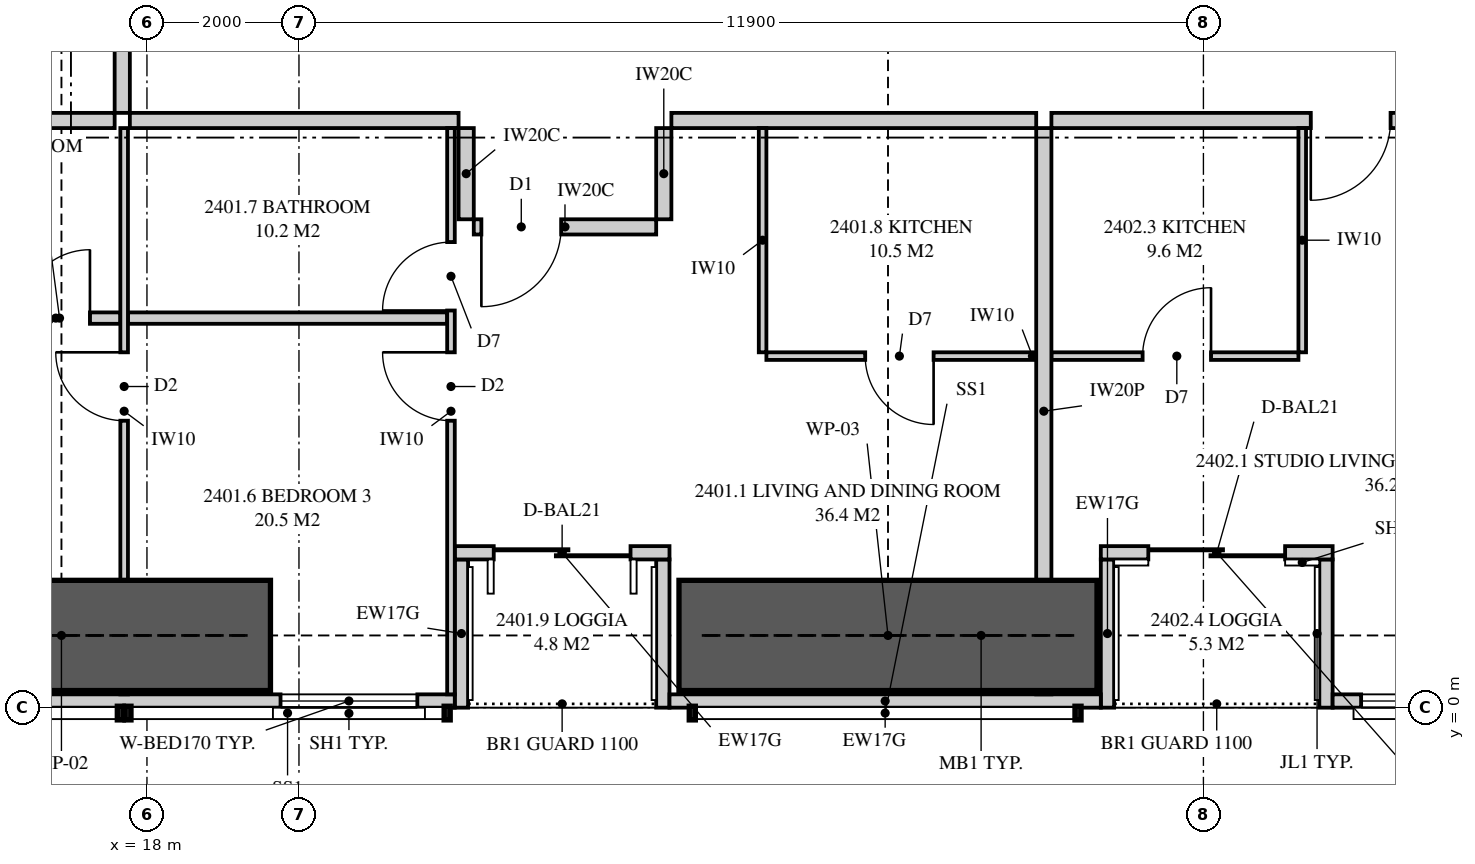
"""IFC4 building model, lengths in metres.
Left out: names, types, materials, properties, quantities, classifications, styles, units other than length and angle.
Written with IfcOpenShell. Run it as: python <this file> out.ifc"""

import sys

from ifc_helpers import new_model, si_unit, direction, frame, frame_2d, origin, place, context, subcontext, project, spatial, polyline, rectangle, outline, extrude, element, fill, save


model = new_model("IFC4")
c1 = context("Model", 3, precision=1e-05, world=origin(), true_north=direction((0.0, 1.0)))
c2 = subcontext(c1, "Body", "Model", "MODEL_VIEW")
j1 = project(units=[si_unit("LENGTHUNIT", "METRE"), si_unit("PLANEANGLEUNIT", "RADIAN")], contexts=[c1])
p1 = place(None, origin())
s1 = spatial("IfcSite", under=j1, at=p1, CompositionType="ELEMENT")
p2 = place(p1, origin())
s2 = spatial("IfcBuilding", under=s1, at=p2, CompositionType="ELEMENT")
p3 = place(p2, frame((0.0, 0.0, 91.45)))
s3 = spatial("IfcBuildingStorey", under=s2, at=p3, CompositionType="ELEMENT", Elevation=91.45)
p4 = place(p3, frame((9.051, 0.087, 0.0), z_axis=(0.0, 0.0, 1.0), x_axis=(1.0, 0.0, 0.0)))
e1 = element("IfcWall", 1, at=p4, inside=s3, PredefinedType="SOLIDWALL", context=c2, shape_type="SweptSolid", body=[
    extrude(outline(polyline([(0.0, 0.0), (12.999, 0.0), (12.999, 2.15), (7.824, 2.15), (7.824, 3.11), (7.666, 3.11), (7.666, 2.15), (7.62, 2.15), (7.62, 3.11), (0.0, 3.11), (0.0, 0.0)])), frame((0.0, 0.087, 0.0), z_axis=(0.0, -1.0, 0.0), x_axis=(1.0, 0.0, 0.0)), (0.0, 0.0, 1.0), 0.175),
])
p5 = place(p4, frame((3.134, 0.0, 0.4)))
e2 = element("IfcOpeningElement", 2, at=p5, cuts=e1, PredefinedType="OPENING", context=c2, shape_type="SweptSolid", body=[
    extrude(rectangle(XDim=1.8, YDim=1.7, at=frame_2d((0.9, 0.85))), frame((0.0, 0.097, 0.0), z_axis=(0.0, -1.0, 0.0), x_axis=(1.0, 0.0, 0.0)), (0.0, 0.0, 1.0), 0.195),
])
p6 = place(p4, frame((10.706, 0.0, 0.4)))
e3 = element("IfcOpeningElement", 3, at=p6, cuts=e1, PredefinedType="OPENING", context=c2, shape_type="SweptSolid", body=[
    extrude(rectangle(XDim=1.8, YDim=1.7, at=frame_2d((0.9, 0.85))), frame((0.0, 0.097, 0.0), z_axis=(0.0, -1.0, 0.0), x_axis=(1.0, 0.0, 0.0)), (0.0, 0.0, 1.0), 0.195),
])
p7 = place(p3, frame((24.875, 0.087, 0.0), z_axis=(0.0, 0.0, 1.0), x_axis=(1.0, 0.0, 0.0)))
e4 = element("IfcWall", 4, at=p7, inside=s3, PredefinedType="SOLIDWALL", context=c2, shape_type="SweptSolid", body=[
    extrude(rectangle(XDim=5.675, YDim=0.175, at=frame_2d((2.837, 0.0))), origin(), (0.0, 0.0, 1.0), 2.15),
])
p8 = place(p3, frame((33.6, 0.087, 0.0), z_axis=(0.0, 0.0, 1.0), x_axis=(1.0, 0.0, 0.0)))
e5 = element("IfcWall", 5, at=p8, inside=s3, PredefinedType="SOLIDWALL", context=c2, shape_type="SweptSolid", body=[
    extrude(outline(polyline([(0.0, 0.0), (7.825, 0.0), (7.825, 3.11), (5.228, 3.11), (5.228, 2.15), (5.183, 2.15), (5.183, 3.11), (5.025, 3.11), (5.025, 2.15), (0.0, 2.15), (0.0, 0.0)])), frame((0.0, 0.087, 0.0), z_axis=(0.0, -1.0, 0.0), x_axis=(1.0, 0.0, 0.0)), (0.0, 0.0, 1.0), 0.175),
])
p9 = place(p8, frame((0.375, 0.0, 0.4)))
e6 = element("IfcOpeningElement", 6, at=p9, cuts=e5, PredefinedType="OPENING", context=c2, shape_type="SweptSolid", body=[
    extrude(rectangle(XDim=1.8, YDim=1.7, at=frame_2d((0.9, 0.85))), frame((0.0, 0.097, 0.0), z_axis=(0.0, -1.0, 0.0), x_axis=(1.0, 0.0, 0.0)), (0.0, 0.0, 1.0), 0.195),
])
p10 = place(p3, frame((22.05, 2.038, 0.0), z_axis=(0.0, 0.0, 1.0), x_axis=(1.0, 0.0, 0.0)))
e7 = element("IfcWall", 7, at=p10, inside=s3, PredefinedType="SOLIDWALL", context=c2, shape_type="SweptSolid", body=[
    extrude(rectangle(XDim=2.825, YDim=0.175, at=frame_2d((1.413, 0.0))), origin(), (0.0, 0.0, 1.0), 3.11),
])
p11 = place(p10, frame((0.512, 0.0, 0.0)))
e8 = element("IfcOpeningElement", 8, at=p11, cuts=e7, PredefinedType="OPENING", context=c2, shape_type="SweptSolid", body=[
    extrude(rectangle(XDim=1.8, YDim=2.1, at=frame_2d((0.9, 1.05))), frame((0.0, 0.097, 0.0), z_axis=(0.0, -1.0, 0.0), x_axis=(1.0, 0.0, 0.0)), (0.0, 0.0, 1.0), 0.195),
])
for number, where, z_axis, x_axis in (
    (9, (22.137, 0.0, 0.0), (0.0, 0.0, 1.0), (0.0, 1.0, 0.0)),
    (10, (24.788, 0.0, 0.0), (0.0, 0.0, 1.0), (0.0, 1.0, 0.0)),
):
    element("IfcWall", number, at=place(p3, frame(where, z_axis=z_axis, x_axis=x_axis)), inside=s3, PredefinedType="SOLIDWALL", context=c2, shape_type="SweptSolid", body=[
        extrude(outline(polyline([(0.0, 0.0), (1.95, 0.0), (1.95, 3.11), (1.75, 3.11), (1.75, 2.15), (0.15, 2.15), (0.15, 3.11), (0.0, 3.11), (0.0, 0.0)])), frame((0.0, 0.087, 0.0), z_axis=(0.0, -1.0, 0.0), x_axis=(1.0, 0.0, 0.0)), (0.0, 0.0, 1.0), 0.175),
    ])
p12 = place(p3, frame((30.55, 2.038, 0.0), z_axis=(0.0, 0.0, 1.0), x_axis=(1.0, 0.0, 0.0)))
e11 = element("IfcWall", 11, at=p12, inside=s3, PredefinedType="SOLIDWALL", context=c2, shape_type="SweptSolid", body=[
    extrude(rectangle(XDim=3.05, YDim=0.175, at=frame_2d((1.525, 0.0))), origin(), (0.0, 0.0, 1.0), 3.11),
])
p13 = place(p12, frame((0.625, 0.0, 0.0)))
e12 = element("IfcOpeningElement", 12, at=p13, cuts=e11, PredefinedType="OPENING", context=c2, shape_type="SweptSolid", body=[
    extrude(rectangle(XDim=1.8, YDim=2.1, at=frame_2d((0.9, 1.05))), frame((0.0, 0.097, 0.0), z_axis=(0.0, -1.0, 0.0), x_axis=(1.0, 0.0, 0.0)), (0.0, 0.0, 1.0), 0.195),
])
for number, where, z_axis, x_axis in (
    (13, (30.637, 0.0, 0.0), (0.0, 0.0, 1.0), (0.0, 1.0, 0.0)),
    (14, (33.512, 0.0, 0.0), (0.0, 0.0, 1.0), (0.0, 1.0, 0.0)),
):
    element("IfcWall", number, at=place(p3, frame(where, z_axis=z_axis, x_axis=x_axis)), inside=s3, PredefinedType="SOLIDWALL", context=c2, shape_type="SweptSolid", body=[
        extrude(outline(polyline([(0.0, 0.0), (1.95, 0.0), (1.95, 3.11), (1.75, 3.11), (1.75, 2.15), (0.15, 2.15), (0.15, 3.11), (0.0, 3.11), (0.0, 0.0)])), frame((0.0, 0.087, 0.0), z_axis=(0.0, -1.0, 0.0), x_axis=(1.0, 0.0, 0.0)), (0.0, 0.0, 1.0), 0.175),
    ])
p14 = place(p3, frame((29.8, 0.175, 0.0), z_axis=(0.0, 0.0, 1.0), x_axis=(0.0, 1.0, 0.0)))
e15 = element("IfcWall", 15, at=p14, inside=s3, PredefinedType="PARTITIONING", context=c2, shape_type="SweptSolid", body=[
    extrude(outline(polyline([(0.529, 2.15), (0.0, 2.15), (0.0, 0.0), (0.529, 0.0), (0.529, 0.103), (1.021, 0.103), (1.021, 0.0), (7.45, 0.0), (7.45, 3.11), (1.685, 3.11), (1.685, 2.15), (1.021, 2.15), (1.021, 2.047), (0.529, 2.047), (0.529, 2.15)])), frame((0.0, 0.1, 0.0), z_axis=(0.0, -1.0, 0.0), x_axis=(1.0, 0.0, 0.0)), (0.0, 0.0, 1.0), 0.2),
])
p15 = place(p3, frame((17.775, 7.725, 0.0), z_axis=(0.0, 0.0, 1.0), x_axis=(1.0, 0.0, 0.0)))
e16 = element("IfcWall", 16, at=p15, inside=s3, PredefinedType="PARTITIONING", context=c2, shape_type="SweptSolid", body=[
    extrude(rectangle(XDim=4.325, YDim=0.2, at=frame_2d((2.163, 0.0))), origin(), (0.0, 0.0, 1.0), 3.11),
])
p16 = place(p3, frame((17.7, 0.175, 0.0), z_axis=(0.0, 0.0, 1.0), x_axis=(0.0, 1.0, 0.0)))
e17 = element("IfcWall", 17, at=p16, inside=s3, PredefinedType="PARTITIONING", context=c2, shape_type="SweptSolid", body=[
    extrude(outline(polyline([(1.635, 2.15), (0.0, 2.15), (0.0, 0.0), (7.45, 0.0), (7.45, 3.11), (1.635, 3.11), (1.635, 2.15)]), holes=[polyline([(1.021, 0.116), (0.529, 0.116), (0.529, 0.906), (1.021, 0.906), (1.021, 0.116)]), polyline([(1.021, 1.244), (0.529, 1.244), (0.529, 2.034), (1.021, 2.034), (1.021, 1.244)])]), frame((0.0, 0.05, 0.0), z_axis=(0.0, -1.0, 0.0), x_axis=(1.0, 0.0, 0.0)), (0.0, 0.0, 1.0), 0.1),
])
p17 = place(p16, frame((3.6, 0.0, 0.0)))
e18 = element("IfcOpeningElement", 18, at=p17, cuts=e17, PredefinedType="OPENING", context=c2, shape_type="SweptSolid", body=[
    extrude(rectangle(XDim=0.9, YDim=2.1, at=frame_2d((0.45, 1.05))), frame((0.0, 0.06, 0.0), z_axis=(0.0, -1.0, 0.0), x_axis=(1.0, 0.0, 0.0)), (0.0, 0.0, 1.0), 0.12),
])
p18 = place(p3, frame((22.0, 0.175, 0.0), z_axis=(0.0, 0.0, 1.0), x_axis=(0.0, 1.0, 0.0)))
e19 = element("IfcWall", 19, at=p18, inside=s3, PredefinedType="PARTITIONING", context=c2, shape_type="SweptSolid", body=[
    extrude(outline(polyline([(0.0, 0.0), (7.45, 0.0), (7.45, 3.11), (1.635, 3.11), (1.635, 2.15), (0.0, 2.15), (0.0, 3.11), (0.0, 0.0)])), frame((0.0, 0.05, 0.0), z_axis=(0.0, -1.0, 0.0), x_axis=(1.0, 0.0, 0.0)), (0.0, 0.0, 1.0), 0.1),
])
p19 = place(p18, frame((3.6, 0.0, 0.0)))
e20 = element("IfcOpeningElement", 20, at=p19, cuts=e19, PredefinedType="OPENING", context=c2, shape_type="SweptSolid", body=[
    extrude(rectangle(XDim=0.9, YDim=2.1, at=frame_2d((0.45, 1.05))), frame((0.0, 0.06, 0.0), z_axis=(0.0, -1.0, 0.0), x_axis=(1.0, 0.0, 0.0)), (0.0, 0.0, 1.0), 0.12),
])
p20 = place(p18, frame((5.05, 0.0, 0.0)))
e21 = element("IfcOpeningElement", 21, at=p20, cuts=e19, PredefinedType="OPENING", context=c2, shape_type="SweptSolid", body=[
    extrude(rectangle(XDim=0.9, YDim=2.1, at=frame_2d((0.45, 1.05))), frame((0.0, 0.06, 0.0), z_axis=(0.0, -1.0, 0.0), x_axis=(1.0, 0.0, 0.0)), (0.0, 0.0, 1.0), 0.12),
])
p21 = place(p3, frame((11.75, 5.125, 0.0), z_axis=(0.0, 0.0, 1.0), x_axis=(1.0, 0.0, 0.0)))
e22 = element("IfcWall", 22, at=p21, inside=s3, PredefinedType="PLUMBINGWALL", context=c2, shape_type="SweptSolid", body=[
    extrude(outline(polyline([(0.0, 0.0), (5.9, 0.0), (5.9, 3.11), (5.438, 3.11), (5.438, 2.541), (4.812, 2.541), (4.812, 3.11), (0.0, 3.11), (0.0, 0.0)])), frame((0.0, 0.075, 0.0), z_axis=(0.0, -1.0, 0.0), x_axis=(1.0, 0.0, 0.0)), (0.0, 0.0, 1.0), 0.15),
])
p22 = place(p21, frame((4.6, 0.0, 0.0)))
e23 = element("IfcOpeningElement", 23, at=p22, cuts=e22, PredefinedType="OPENING", context=c2, shape_type="SweptSolid", body=[
    extrude(rectangle(XDim=0.9, YDim=2.1, at=frame_2d((0.45, 1.05))), frame((0.0, 0.085, 0.0), z_axis=(0.0, -1.0, 0.0), x_axis=(1.0, 0.0, 0.0)), (0.0, 0.0, 1.0), 0.17),
])
p23 = place(p3, frame((17.75, 5.125, 0.0), z_axis=(0.0, 0.0, 1.0), x_axis=(1.0, 0.0, 0.0)))
e24 = element("IfcWall", 24, at=p23, inside=s3, PredefinedType="PLUMBINGWALL", context=c2, shape_type="SweptSolid", body=[
    extrude(rectangle(XDim=4.2, YDim=0.15, at=frame_2d((2.1, 0.0))), origin(), (0.0, 0.0, 1.0), 3.11),
])
p24 = place(p3, frame((26.15, 4.625, 0.0), z_axis=(0.0, 0.0, 1.0), x_axis=(1.0, 0.0, 0.0)))
e25 = element("IfcWall", 25, at=p24, inside=s3, PredefinedType="PARTITIONING", context=c2, shape_type="SweptSolid", body=[
    extrude(outline(polyline([(0.0, 0.0), (3.55, 0.0), (3.55, 3.11), (1.887, 3.11), (1.887, 2.541), (1.312, 2.541), (1.312, 3.11), (0.0, 3.11), (0.0, 0.0)])), frame((0.0, 0.05, 0.0), z_axis=(0.0, -1.0, 0.0), x_axis=(1.0, 0.0, 0.0)), (0.0, 0.0, 1.0), 0.1),
])
p25 = place(p24, frame((1.3, 0.0, 0.0)))
e26 = element("IfcOpeningElement", 26, at=p25, cuts=e25, PredefinedType="OPENING", context=c2, shape_type="SweptSolid", body=[
    extrude(rectangle(XDim=0.9, YDim=2.1, at=frame_2d((0.45, 1.05))), frame((0.0, 0.06, 0.0), z_axis=(0.0, -1.0, 0.0), x_axis=(1.0, 0.0, 0.0)), (0.0, 0.0, 1.0), 0.12),
])
p26 = place(p3, frame((26.1, 4.675, 0.0), z_axis=(0.0, 0.0, 1.0), x_axis=(0.0, 1.0, 0.0)))
e27 = element("IfcWall", 27, at=p26, inside=s3, PredefinedType="PARTITIONING", context=c2, shape_type="SweptSolid", body=[
    extrude(rectangle(XDim=2.95, YDim=0.1, at=frame_2d((1.475, 0.0))), origin(), (0.0, 0.0, 1.0), 3.11),
])
p27 = place(p3, frame((29.9, 7.725, 0.0), z_axis=(0.0, 0.0, 1.0), x_axis=(1.0, 0.0, 0.0)))
e28 = element("IfcWall", 28, at=p27, inside=s3, PredefinedType="PARTITIONING", context=c2, shape_type="SweptSolid", body=[
    extrude(rectangle(XDim=7.825, YDim=0.2, at=frame_2d((3.913, 0.0))), origin(), (0.0, 0.0, 1.0), 3.11),
])
p28 = place(p27, frame((3.413, 0.0, 0.0)))
e29 = element("IfcOpeningElement", 29, at=p28, cuts=e28, PredefinedType="OPENING", context=c2, shape_type="SweptSolid", body=[
    extrude(rectangle(XDim=1.05, YDim=2.2, at=frame_2d((0.525, 1.1))), frame((0.0, 0.11, 0.0), z_axis=(0.0, -1.0, 0.0), x_axis=(1.0, 0.0, 0.0)), (0.0, 0.0, 1.0), 0.22),
])
p29 = place(p3, frame((29.9, 4.625, 0.0), z_axis=(0.0, 0.0, 1.0), x_axis=(1.0, 0.0, 0.0)))
e30 = element("IfcWall", 30, at=p29, inside=s3, PredefinedType="PARTITIONING", context=c2, shape_type="SweptSolid", body=[
    extrude(rectangle(XDim=3.25, YDim=0.1, at=frame_2d((1.625, 0.0))), origin(), (0.0, 0.0, 1.0), 3.11),
])
p30 = place(p29, frame((1.2, 0.0, 0.0)))
e31 = element("IfcOpeningElement", 31, at=p30, cuts=e30, PredefinedType="OPENING", context=c2, shape_type="SweptSolid", body=[
    extrude(rectangle(XDim=0.9, YDim=2.1, at=frame_2d((0.45, 1.05))), frame((0.0, 0.06, 0.0), z_axis=(0.0, -1.0, 0.0), x_axis=(1.0, 0.0, 0.0)), (0.0, 0.0, 1.0), 0.12),
])
p31 = place(p3, frame((33.2, 4.675, 0.0), z_axis=(0.0, 0.0, 1.0), x_axis=(0.0, 1.0, 0.0)))
e32 = element("IfcWall", 32, at=p31, inside=s3, PredefinedType="PARTITIONING", context=c2, shape_type="SweptSolid", body=[
    extrude(rectangle(XDim=2.95, YDim=0.1, at=frame_2d((1.475, 0.0))), origin(), (0.0, 0.0, 1.0), 3.11),
])
p32 = place(p3, frame((6.0, 7.725, 0.0), z_axis=(0.0, 0.0, 1.0), x_axis=(1.0, 0.0, 0.0)))
e33 = element("IfcWall", 33, at=p32, inside=s3, PredefinedType="PARTITIONING", context=c2, shape_type="SweptSolid", body=[
    extrude(outline(polyline([(0.0, 0.0), (11.575, 0.0), (11.575, 3.11), (11.212, 3.11), (11.212, 2.541), (10.538, 2.541), (10.538, 3.11), (5.51, 3.11), (5.51, 2.51), (2.969, 2.51), (2.969, 2.541), (2.727, 2.541), (2.727, 2.15), (0.884, 2.15), (0.884, 3.11), (0.0, 3.11), (0.0, 0.0)])), frame((0.0, 0.1, 0.0), z_axis=(0.0, -1.0, 0.0), x_axis=(1.0, 0.0, 0.0)), (0.0, 0.0, 1.0), 0.2),
])
p33 = place(p3, frame((17.675, 7.825, 0.0), z_axis=(0.0, 0.0, 1.0), x_axis=(0.0, 1.0, 0.0)))
e34 = element("IfcWall", 34, at=p33, inside=s3, PredefinedType="PARTITIONING", context=c2, shape_type="SweptSolid", body=[
    extrude(outline(polyline([(0.0, 0.0), (9.075, 0.0), (9.075, 3.11), (3.087, 3.11), (3.087, 2.541), (2.413, 2.541), (2.413, 3.11), (0.0, 3.11), (0.0, 0.0)])), frame((0.0, 0.1, 0.0), z_axis=(0.0, -1.0, 0.0), x_axis=(1.0, 0.0, 0.0)), (0.0, 0.0, 1.0), 0.2),
])
p34 = place(p3, frame((24.9, 7.725, 0.0), z_axis=(0.0, 0.0, 1.0), x_axis=(1.0, 0.0, 0.0)))
e35 = element("IfcWall", 35, at=p34, inside=s3, PredefinedType="PARTITIONING", context=c2, shape_type="SweptSolid", body=[
    extrude(outline(polyline([(0.0, 0.0), (4.8, 0.0), (4.8, 3.11), (3.187, 3.11), (3.187, 2.541), (2.513, 2.541), (2.513, 3.11), (0.0, 3.11), (0.0, 0.0)])), frame((0.0, 0.1, 0.0), z_axis=(0.0, -1.0, 0.0), x_axis=(1.0, 0.0, 0.0)), (0.0, 0.0, 1.0), 0.2),
])
p35 = place(p3, frame((22.3, 6.325, 0.0), z_axis=(0.0, 0.0, 1.0), x_axis=(1.0, 0.0, 0.0)))
e36 = element("IfcWall", 36, at=p35, inside=s3, PredefinedType="PARTITIONING", context=c2, shape_type="SweptSolid", body=[
    extrude(rectangle(XDim=2.4, YDim=0.2, at=frame_2d((1.2, 0.0))), origin(), (0.0, 0.0, 1.0), 3.11),
])
p36 = place(p35, frame((0.1, 0.0, 0.0)))
e37 = element("IfcOpeningElement", 37, at=p36, cuts=e36, PredefinedType="OPENING", context=c2, shape_type="SweptSolid", body=[
    extrude(rectangle(XDim=1.05, YDim=2.2, at=frame_2d((0.525, 1.1))), frame((0.0, 0.11, 0.0), z_axis=(0.0, -1.0, 0.0), x_axis=(1.0, 0.0, 0.0)), (0.0, 0.0, 1.0), 0.22),
])
for number, where, z_axis, x_axis in (
    (38, (22.2, 7.625, 0.0), (0.0, 0.0, 1.0), (0.0, -1.0, 0.0)),
    (39, (24.8, 7.625, 0.0), (0.0, 0.0, 1.0), (0.0, -1.0, 0.0)),
):
    element("IfcWall", number, at=place(p3, frame(where, z_axis=z_axis, x_axis=x_axis)), inside=s3, PredefinedType="PARTITIONING", context=c2, shape_type="SweptSolid", body=[
        extrude(rectangle(XDim=1.2, YDim=0.2, at=frame_2d((0.6, 0.0))), origin(), (0.0, 0.0, 1.0), 3.11),
    ])
for number, where, z_axis, x_axis in (
    (40, (14.125, 0.95, 0.0), (0.0, 0.0, 1.0), (1.0, 0.0, 0.0)),
    (41, (25.0, 0.95, 0.0), (0.0, 0.0, 1.0), (1.0, 0.0, 0.0)),
):
    element("IfcWall", number, at=place(p3, frame(where, z_axis=z_axis, x_axis=x_axis)), inside=s3, PredefinedType="SHEAR", context=c2, shape_type="SweptSolid", body=[
        extrude(rectangle(XDim=5.5, YDim=1.45, at=frame_2d((2.75, 0.0))), origin(), (0.0, 0.0, 1.0), 3.35),
    ])
p37 = place(p6, origin())
e42 = element("IfcWindow", 42, at=p37, inside=s3, PartitioningType="SINGLE_PANEL", PredefinedType="WINDOW", context=c2, shape_type="SweptSolid", body=[
    extrude(rectangle(XDim=1.8, YDim=1.7, at=frame_2d((0.9, 0.85))), frame((0.0, 0.03, 0.0), z_axis=(0.0, -1.0, 0.0), x_axis=(1.0, 0.0, 0.0)), (0.0, 0.0, 1.0), 0.06),
])
fill(e3, e42)
p38 = place(p11, origin())
e43 = element("IfcDoor", 43, at=p38, inside=s3, OperationType="SLIDING_TO_LEFT", PredefinedType="DOOR", context=c2, shape_type="SweptSolid", body=[
    extrude(rectangle(XDim=1.8, YDim=2.1, at=frame_2d((0.9, 1.05))), frame((0.0, 0.025, 0.0), z_axis=(0.0, -1.0, 0.0), x_axis=(1.0, 0.0, 0.0)), (0.0, 0.0, 1.0), 0.05),
])
fill(e8, e43)
p39 = place(p13, origin())
e44 = element("IfcDoor", 44, at=p39, inside=s3, OperationType="SLIDING_TO_LEFT", PredefinedType="DOOR", context=c2, shape_type="SweptSolid", body=[
    extrude(rectangle(XDim=1.8, YDim=2.1, at=frame_2d((0.9, 1.05))), frame((0.0, 0.025, 0.0), z_axis=(0.0, -1.0, 0.0), x_axis=(1.0, 0.0, 0.0)), (0.0, 0.0, 1.0), 0.05),
])
fill(e12, e44)
p40 = place(p9, origin())
e45 = element("IfcWindow", 45, at=p40, inside=s3, PartitioningType="SINGLE_PANEL", PredefinedType="WINDOW", context=c2, shape_type="SweptSolid", body=[
    extrude(rectangle(XDim=1.8, YDim=1.7, at=frame_2d((0.9, 0.85))), frame((0.0, 0.03, 0.0), z_axis=(0.0, -1.0, 0.0), x_axis=(1.0, 0.0, 0.0)), (0.0, 0.0, 1.0), 0.06),
])
fill(e6, e45)
p41 = place(p36, frame((1.05, 0.0, 0.0), z_axis=(0.0, 0.0, 1.0), x_axis=(-1.0, 0.0, 0.0)))
e46 = element("IfcDoor", 46, at=p41, inside=s3, OperationType="SINGLE_SWING_RIGHT", PredefinedType="DOOR", context=c2, shape_type="SweptSolid", body=[
    extrude(rectangle(XDim=1.05, YDim=2.2, at=frame_2d((0.525, 1.1))), frame((0.0, 0.025, 0.0), z_axis=(0.0, -1.0, 0.0), x_axis=(1.0, 0.0, 0.0)), (0.0, 0.0, 1.0), 0.05),
])
fill(e37, e46)
p42 = place(p17, origin())
e47 = element("IfcDoor", 47, at=p42, inside=s3, OperationType="SINGLE_SWING_RIGHT", PredefinedType="DOOR", context=c2, shape_type="SweptSolid", body=[
    extrude(rectangle(XDim=0.9, YDim=2.1, at=frame_2d((0.45, 1.05))), frame((0.0, 0.025, 0.0), z_axis=(0.0, -1.0, 0.0), x_axis=(1.0, 0.0, 0.0)), (0.0, 0.0, 1.0), 0.05),
])
fill(e18, e47)
p43 = place(p22, origin())
e48 = element("IfcDoor", 48, at=p43, inside=s3, OperationType="SINGLE_SWING_RIGHT", PredefinedType="DOOR", context=c2, shape_type="SweptSolid", body=[
    extrude(rectangle(XDim=0.9, YDim=2.1, at=frame_2d((0.45, 1.05))), frame((0.0, 0.025, 0.0), z_axis=(0.0, -1.0, 0.0), x_axis=(1.0, 0.0, 0.0)), (0.0, 0.0, 1.0), 0.05),
])
fill(e23, e48)
p44 = place(p19, origin())
e49 = element("IfcDoor", 49, at=p44, inside=s3, OperationType="SINGLE_SWING_RIGHT", PredefinedType="DOOR", context=c2, shape_type="SweptSolid", body=[
    extrude(rectangle(XDim=0.9, YDim=2.1, at=frame_2d((0.45, 1.05))), frame((0.0, 0.025, 0.0), z_axis=(0.0, -1.0, 0.0), x_axis=(1.0, 0.0, 0.0)), (0.0, 0.0, 1.0), 0.05),
])
fill(e20, e49)
p45 = place(p20, origin())
e50 = element("IfcDoor", 50, at=p45, inside=s3, OperationType="SINGLE_SWING_LEFT", PredefinedType="DOOR", context=c2, shape_type="SweptSolid", body=[
    extrude(rectangle(XDim=0.9, YDim=2.1, at=frame_2d((0.45, 1.05))), frame((0.0, 0.025, 0.0), z_axis=(0.0, -1.0, 0.0), x_axis=(1.0, 0.0, 0.0)), (0.0, 0.0, 1.0), 0.05),
])
fill(e21, e50)
p46 = place(p25, frame((0.9, 0.0, 0.0), z_axis=(0.0, 0.0, 1.0), x_axis=(-1.0, 0.0, 0.0)))
e51 = element("IfcDoor", 51, at=p46, inside=s3, OperationType="SINGLE_SWING_LEFT", PredefinedType="DOOR", context=c2, shape_type="SweptSolid", body=[
    extrude(rectangle(XDim=0.9, YDim=2.1, at=frame_2d((0.45, 1.05))), frame((0.0, 0.025, 0.0), z_axis=(0.0, -1.0, 0.0), x_axis=(1.0, 0.0, 0.0)), (0.0, 0.0, 1.0), 0.05),
])
fill(e26, e51)
p47 = place(p28, frame((1.05, 0.0, 0.0), z_axis=(0.0, 0.0, 1.0), x_axis=(-1.0, 0.0, 0.0)))
e52 = element("IfcDoor", 52, at=p47, inside=s3, OperationType="SINGLE_SWING_RIGHT", PredefinedType="DOOR", context=c2, shape_type="SweptSolid", body=[
    extrude(rectangle(XDim=1.05, YDim=2.2, at=frame_2d((0.525, 1.1))), frame((0.0, 0.025, 0.0), z_axis=(0.0, -1.0, 0.0), x_axis=(1.0, 0.0, 0.0)), (0.0, 0.0, 1.0), 0.05),
])
fill(e29, e52)
p48 = place(p30, origin())
e53 = element("IfcDoor", 53, at=p48, inside=s3, OperationType="SINGLE_SWING_RIGHT", PredefinedType="DOOR", context=c2, shape_type="SweptSolid", body=[
    extrude(rectangle(XDim=0.9, YDim=2.1, at=frame_2d((0.45, 1.05))), frame((0.0, 0.025, 0.0), z_axis=(0.0, -1.0, 0.0), x_axis=(1.0, 0.0, 0.0)), (0.0, 0.0, 1.0), 0.05),
])
fill(e31, e53)
save(model, sys.argv[1])
